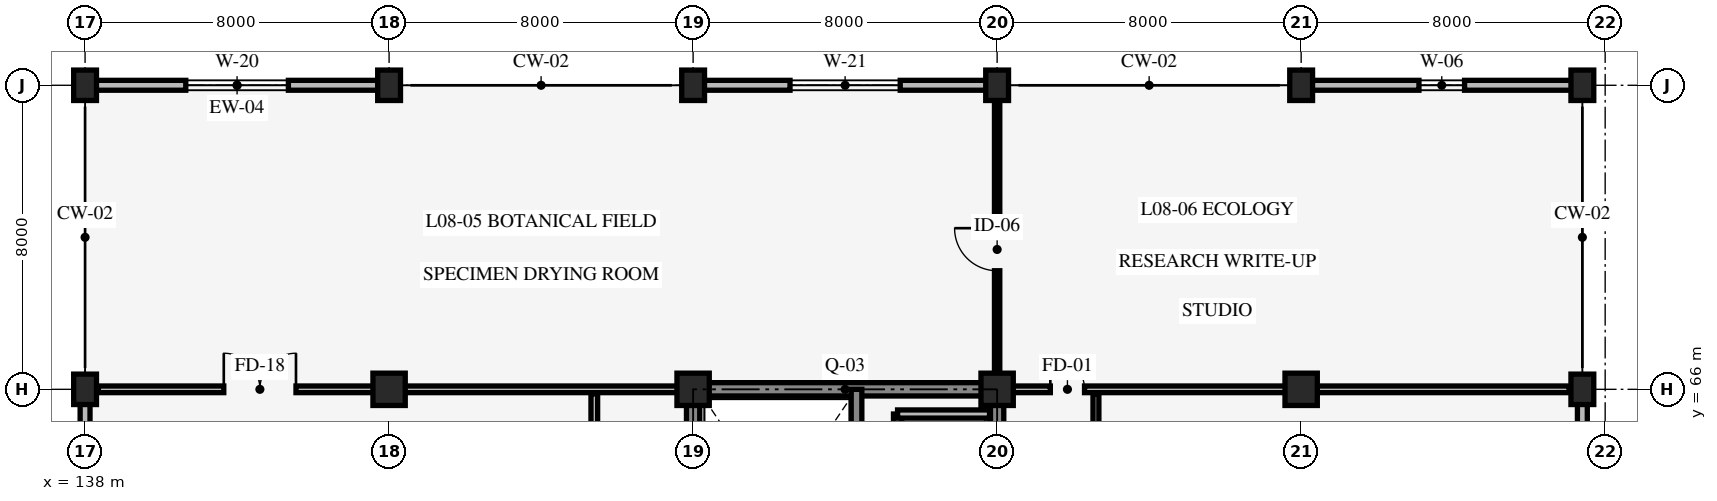
"""IFC4 building model, lengths in metres.
Left out: names, types, materials, properties, quantities, classifications, styles, units other than length and angle.
Written with IfcOpenShell. Run it as: python <this file> out.ifc"""

import sys

from ifc_helpers import new_model, si_unit, direction, frame, frame_2d, origin, origin_2d, place, context, subcontext, project, spatial, rectangle, extrude, element, fill, save


model = new_model("IFC4")
c1 = context("Model", 3, precision=1e-05, world=origin(), true_north=direction((0.0, 1.0)))
c2 = subcontext(c1, "Body", "Model", "MODEL_VIEW")
j1 = project(units=[si_unit("LENGTHUNIT", "METRE"), si_unit("PLANEANGLEUNIT", "RADIAN")], contexts=[c1])
p1 = place(None, origin())
s1 = spatial("IfcSite", under=j1, at=p1, CompositionType="ELEMENT")
p2 = place(p1, origin())
s2 = spatial("IfcBuilding", under=s1, at=p2, CompositionType="ELEMENT")
p3 = place(p2, frame((0.0, 0.0, 31.8)))
s3 = spatial("IfcBuildingStorey", under=s2, at=p3, CompositionType="ELEMENT", Elevation=31.8)
p4 = place(p3, frame((162.0, 58.0, 0.0), z_axis=(0.0, 0.0, 1.0), x_axis=(0.0, 1.0, 0.0)))
e1 = element("IfcWall", 1, at=p4, inside=s3, PredefinedType="SHEAR", context=c2, shape_type="SweptSolid", body=[
    extrude(rectangle(XDim=8.0, YDim=0.35, at=frame_2d((4.0, 0.0))), origin(), (0.0, 0.0, 1.0), 3.95),
])
p5 = place(p4, frame((3.275, 0.0, 0.0)))
e2 = element("IfcOpeningElement", 2, at=p5, cuts=e1, PredefinedType="OPENING", context=c2, shape_type="SweptSolid", body=[
    extrude(rectangle(XDim=1.05, YDim=2.2, at=frame_2d((0.525, 1.1))), frame((0.0, 0.185, 0.0), z_axis=(0.0, -1.0, 0.0), x_axis=(1.0, 0.0, 0.0)), (0.0, 0.0, 1.0), 0.37),
])
p6 = place(p4, frame((5.45, 0.0, 0.0)))
e3 = element("IfcOpeningElement", 3, at=p6, cuts=e1, PredefinedType="OPENING", context=c2, shape_type="SweptSolid", body=[
    extrude(rectangle(XDim=1.4, YDim=2.3, at=frame_2d((0.7, 1.15))), frame((0.0, 0.185, 0.0), z_axis=(0.0, -1.0, 0.0), x_axis=(1.0, 0.0, 0.0)), (0.0, 0.0, 1.0), 0.37),
])
for number, where, z_axis, x_axis in (
    (4, (162.0, 66.0, 0.0), (0.0, 0.0, 1.0), (-1.0, 0.0, 0.0)),
    (5, (154.0, 66.0, 0.0), (0.0, 0.0, 1.0), (0.0, -1.0, 0.0)),
):
    element("IfcWall", number, at=place(p3, frame(where, z_axis=z_axis, x_axis=x_axis)), inside=s3, PredefinedType="SHEAR", context=c2, shape_type="SweptSolid", body=[
        extrude(rectangle(XDim=8.0, YDim=0.35, at=frame_2d((4.0, 0.0))), origin(), (0.0, 0.0, 1.0), 3.95),
    ])
p7 = place(p3, frame((158.3, 58.0, 0.0), z_axis=(0.0, 0.0, 1.0), x_axis=(0.0, 1.0, 0.0)))
e6 = element("IfcWall", 6, at=p7, inside=s3, PredefinedType="SHEAR", context=c2, shape_type="SweptSolid", body=[
    extrude(rectangle(XDim=8.0, YDim=0.28, at=frame_2d((4.0, 0.0))), origin(), (0.0, 0.0, 1.0), 3.95),
])
for number, where, z_axis, x_axis in (
    (7, (138.0, 66.0, 0.0), (0.0, 0.0, 1.0), (1.0, 0.0, 0.0)),
    (8, (138.0, 74.0, 0.0), (0.0, 0.0, 1.0), (1.0, 0.0, 0.0)),
):
    element("IfcColumn", number, at=place(p3, frame(where, z_axis=z_axis, x_axis=x_axis)), inside=s3, PredefinedType="COLUMN", context=c2, shape_type="SweptSolid", body=[
        extrude(rectangle(XDim=0.6, YDim=0.8, at=origin_2d()), origin(), (0.0, 0.0, 1.0), 4.2),
    ])
p8 = place(p3, frame((146.0, 66.0, 0.0), z_axis=(0.0, 0.0, 1.0), x_axis=(1.0, 0.0, 0.0)))
e9 = element("IfcColumn", 9, at=p8, inside=s3, PredefinedType="COLUMN", context=c2, shape_type="SweptSolid", body=[
    extrude(rectangle(XDim=0.85, YDim=0.85, at=origin_2d()), origin(), (0.0, 0.0, 1.0), 4.2),
])
p9 = place(p3, frame((146.0, 74.0, 0.0), z_axis=(0.0, 0.0, 1.0), x_axis=(1.0, 0.0, 0.0)))
e10 = element("IfcColumn", 10, at=p9, inside=s3, PredefinedType="COLUMN", context=c2, shape_type="SweptSolid", body=[
    extrude(rectangle(XDim=0.6, YDim=0.8, at=origin_2d()), origin(), (0.0, 0.0, 1.0), 4.2),
])
p10 = place(p3, frame((154.0, 66.0, 0.0), z_axis=(0.0, 0.0, 1.0), x_axis=(1.0, 0.0, 0.0)))
e11 = element("IfcColumn", 11, at=p10, inside=s3, PredefinedType="COLUMN", context=c2, shape_type="SweptSolid", body=[
    extrude(rectangle(XDim=0.85, YDim=0.85, at=origin_2d()), origin(), (0.0, 0.0, 1.0), 4.2),
])
p11 = place(p3, frame((154.0, 74.0, 0.0), z_axis=(0.0, 0.0, 1.0), x_axis=(1.0, 0.0, 0.0)))
e12 = element("IfcColumn", 12, at=p11, inside=s3, PredefinedType="COLUMN", context=c2, shape_type="SweptSolid", body=[
    extrude(rectangle(XDim=0.6, YDim=0.8, at=origin_2d()), origin(), (0.0, 0.0, 1.0), 4.2),
])
p12 = place(p3, frame((162.0, 66.0, 0.0), z_axis=(0.0, 0.0, 1.0), x_axis=(1.0, 0.0, 0.0)))
e13 = element("IfcColumn", 13, at=p12, inside=s3, PredefinedType="COLUMN", context=c2, shape_type="SweptSolid", body=[
    extrude(rectangle(XDim=0.85, YDim=0.85, at=origin_2d()), origin(), (0.0, 0.0, 1.0), 4.2),
])
p13 = place(p3, frame((162.0, 74.0, 0.0), z_axis=(0.0, 0.0, 1.0), x_axis=(1.0, 0.0, 0.0)))
e14 = element("IfcColumn", 14, at=p13, inside=s3, PredefinedType="COLUMN", context=c2, shape_type="SweptSolid", body=[
    extrude(rectangle(XDim=0.6, YDim=0.8, at=origin_2d()), origin(), (0.0, 0.0, 1.0), 4.2),
])
p14 = place(p3, frame((170.0, 66.0, 0.0), z_axis=(0.0, 0.0, 1.0), x_axis=(1.0, 0.0, 0.0)))
e15 = element("IfcColumn", 15, at=p14, inside=s3, PredefinedType="COLUMN", context=c2, shape_type="SweptSolid", body=[
    extrude(rectangle(XDim=0.85, YDim=0.85, at=origin_2d()), origin(), (0.0, 0.0, 1.0), 4.2),
])
for number, where, z_axis, x_axis in (
    (16, (170.0, 74.0, 0.0), (0.0, 0.0, 1.0), (1.0, 0.0, 0.0)),
    (17, (177.4, 66.0, 0.0), (0.0, 0.0, 1.0), (1.0, 0.0, 0.0)),
    (18, (177.4, 74.0, 0.0), (0.0, 0.0, 1.0), (1.0, 0.0, 0.0)),
):
    element("IfcColumn", number, at=place(p3, frame(where, z_axis=z_axis, x_axis=x_axis)), inside=s3, PredefinedType="COLUMN", context=c2, shape_type="SweptSolid", body=[
        extrude(rectangle(XDim=0.6, YDim=0.8, at=origin_2d()), origin(), (0.0, 0.0, 1.0), 4.2),
    ])
p15 = place(p3, frame((138.0, 58.0, 0.0), z_axis=(0.0, 0.0, 1.0), x_axis=(0.0, 1.0, 0.0)))
e19 = element("IfcWall", 19, at=p15, inside=s3, PredefinedType="STANDARD", context=c2, shape_type="SweptSolid", body=[
    extrude(rectangle(XDim=8.0, YDim=0.26, at=frame_2d((4.0, 0.0))), origin(), (0.0, 0.0, 1.0), 3.31),
])
p16 = place(p15, frame((2.85, 0.0, 0.85)))
e20 = element("IfcOpeningElement", 20, at=p16, cuts=e19, PredefinedType="OPENING", context=c2, shape_type="SweptSolid", body=[
    extrude(rectangle(XDim=2.3, YDim=1.5, at=frame_2d((1.15, 0.75))), frame((0.0, 0.14, 0.0), z_axis=(0.0, -1.0, 0.0), x_axis=(1.0, 0.0, 0.0)), (0.0, 0.0, 1.0), 0.28),
])
p17 = place(p3, frame((138.0, 74.0, 0.0), z_axis=(0.0, 0.0, 1.0), x_axis=(1.0, 0.0, 0.0)))
e21 = element("IfcWall", 21, at=p17, inside=s3, PredefinedType="STANDARD", context=c2, shape_type="SweptSolid", body=[
    extrude(rectangle(XDim=8.0, YDim=0.26, at=frame_2d((4.0, 0.0))), origin(), (0.0, 0.0, 1.0), 3.36),
])
p18 = place(p17, frame((2.65, 0.0, 0.85)))
e22 = element("IfcOpeningElement", 22, at=p18, cuts=e21, PredefinedType="OPENING", context=c2, shape_type="SweptSolid", body=[
    extrude(rectangle(XDim=2.7, YDim=1.8, at=frame_2d((1.35, 0.9))), frame((0.0, 0.14, 0.0), z_axis=(0.0, -1.0, 0.0), x_axis=(1.0, 0.0, 0.0)), (0.0, 0.0, 1.0), 0.28),
])
p19 = place(p3, frame((154.0, 74.0, 0.0), z_axis=(0.0, 0.0, 1.0), x_axis=(1.0, 0.0, 0.0)))
e23 = element("IfcWall", 23, at=p19, inside=s3, PredefinedType="STANDARD", context=c2, shape_type="SweptSolid", body=[
    extrude(rectangle(XDim=8.0, YDim=0.26, at=frame_2d((4.0, 0.0))), origin(), (0.0, 0.0, 1.0), 3.26),
])
p20 = place(p19, frame((2.55, 0.0, 0.85)))
e24 = element("IfcOpeningElement", 24, at=p20, cuts=e23, PredefinedType="OPENING", context=c2, shape_type="SweptSolid", body=[
    extrude(rectangle(XDim=2.9, YDim=1.7, at=frame_2d((1.45, 0.85))), frame((0.0, 0.14, 0.0), z_axis=(0.0, -1.0, 0.0), x_axis=(1.0, 0.0, 0.0)), (0.0, 0.0, 1.0), 0.28),
])
p21 = place(p3, frame((170.0, 74.0, 0.0), z_axis=(0.0, 0.0, 1.0), x_axis=(1.0, 0.0, 0.0)))
e25 = element("IfcWall", 25, at=p21, inside=s3, PredefinedType="STANDARD", context=c2, shape_type="SweptSolid", body=[
    extrude(rectangle(XDim=7.4, YDim=0.26, at=frame_2d((3.7, 0.0))), origin(), (0.0, 0.0, 1.0), 3.26),
])
p22 = place(p21, frame((3.1, 0.0, 0.85)))
e26 = element("IfcOpeningElement", 26, at=p22, cuts=e25, PredefinedType="OPENING", context=c2, shape_type="SweptSolid", body=[
    extrude(rectangle(XDim=1.2, YDim=1.2, at=frame_2d((0.6, 0.6))), frame((0.0, 0.14, 0.0), z_axis=(0.0, -1.0, 0.0), x_axis=(1.0, 0.0, 0.0)), (0.0, 0.0, 1.0), 0.28),
])
p23 = place(p3, frame((177.4, 66.0, 0.0), z_axis=(0.0, 0.0, 1.0), x_axis=(0.0, -1.0, 0.0)))
e27 = element("IfcWall", 27, at=p23, inside=s3, PredefinedType="STANDARD", context=c2, shape_type="SweptSolid", body=[
    extrude(rectangle(XDim=8.0, YDim=0.26, at=frame_2d((4.0, 0.0))), origin(), (0.0, 0.0, 1.0), 3.31),
])
p24 = place(p23, frame((3.15, 0.0, 0.85)))
e28 = element("IfcOpeningElement", 28, at=p24, cuts=e27, PredefinedType="OPENING", context=c2, shape_type="SweptSolid", body=[
    extrude(rectangle(XDim=1.7, YDim=1.2, at=frame_2d((0.85, 0.6))), frame((0.0, 0.14, 0.0), z_axis=(0.0, -1.0, 0.0), x_axis=(1.0, 0.0, 0.0)), (0.0, 0.0, 1.0), 0.28),
])
p25 = place(p3, frame((159.38, 62.9, 0.0), z_axis=(0.0, 0.0, 1.0), x_axis=(0.0, 1.0, 0.0)))
e29 = element("IfcWall", 29, at=p25, inside=s3, PredefinedType="STANDARD", context=c2, shape_type="SweptSolid", body=[
    extrude(rectangle(XDim=2.45, YDim=0.215, at=frame_2d((1.225, 0.0))), origin(), (0.0, 0.0, 1.0), 3.9),
])
p26 = place(p3, frame((159.38, 65.35, 0.0), z_axis=(0.0, 0.0, 1.0), x_axis=(1.0, 0.0, 0.0)))
e30 = element("IfcWall", 30, at=p26, inside=s3, PredefinedType="STANDARD", context=c2, shape_type="SweptSolid", body=[
    extrude(rectangle(XDim=2.42, YDim=0.215, at=frame_2d((1.21, 0.0))), origin(), (0.0, 0.0, 1.0), 3.9),
])
p27 = place(p3, frame((151.4, 54.12, 0.0), z_axis=(0.0, 0.0, 1.0), x_axis=(0.0, 1.0, 0.0)))
e31 = element("IfcWall", 31, at=p27, inside=s3, PredefinedType="STANDARD", context=c2, shape_type="SweptSolid", body=[
    extrude(rectangle(XDim=11.76, YDim=0.175, at=frame_2d((5.88, 0.0))), origin(), (0.0, 0.0, 1.0), 3.9),
])
p28 = place(p27, frame((5.18, 0.0, 0.0)))
e32 = element("IfcOpeningElement", 32, at=p28, cuts=e31, PredefinedType="OPENING", context=c2, shape_type="SweptSolid", body=[
    extrude(rectangle(XDim=1.4, YDim=2.2, at=frame_2d((0.7, 1.1))), frame((0.0, 0.098, 0.0), z_axis=(0.0, -1.0, 0.0), x_axis=(1.0, 0.0, 0.0)), (0.0, 0.0, 1.0), 0.195),
])
p29 = place(p3, frame((164.6, 58.08, 0.0), z_axis=(0.0, 0.0, 1.0), x_axis=(0.0, 1.0, 0.0)))
e33 = element("IfcWall", 33, at=p29, inside=s3, PredefinedType="STANDARD", context=c2, shape_type="SweptSolid", body=[
    extrude(rectangle(XDim=7.8, YDim=0.155, at=frame_2d((3.9, 0.0))), origin(), (0.0, 0.0, 1.0), 3.9),
])
p30 = place(p29, frame((3.45, 0.0, 0.0)))
e34 = element("IfcOpeningElement", 34, at=p30, cuts=e33, PredefinedType="OPENING", context=c2, shape_type="SweptSolid", body=[
    extrude(rectangle(XDim=0.9, YDim=2.1, at=frame_2d((0.45, 1.05))), frame((0.0, 0.087, 0.0), z_axis=(0.0, -1.0, 0.0), x_axis=(1.0, 0.0, 0.0)), (0.0, 0.0, 1.0), 0.175),
])
p31 = place(p3, frame((138.35, 66.0, 0.0), z_axis=(0.0, 0.0, 1.0), x_axis=(1.0, 0.0, 0.0)))
e35 = element("IfcWall", 35, at=p31, inside=s3, PredefinedType="STANDARD", context=c2, shape_type="SweptSolid", body=[
    extrude(rectangle(XDim=15.3, YDim=0.175, at=frame_2d((7.65, 0.0))), origin(), (0.0, 0.0, 1.0), 3.26),
])
p32 = place(p31, frame((3.3, 0.0, 0.0)))
e36 = element("IfcOpeningElement", 36, at=p32, cuts=e35, PredefinedType="OPENING", context=c2, shape_type="SweptSolid", body=[
    extrude(rectangle(XDim=1.9, YDim=2.35, at=frame_2d((0.95, 1.175))), frame((0.0, 0.098, 0.0), z_axis=(0.0, -1.0, 0.0), x_axis=(1.0, 0.0, 0.0)), (0.0, 0.0, 1.0), 0.195),
])
p33 = place(p3, frame((162.0, 66.12, 0.0), z_axis=(0.0, 0.0, 1.0), x_axis=(0.0, 1.0, 0.0)))
e37 = element("IfcWall", 37, at=p33, inside=s3, PredefinedType="STANDARD", context=c2, shape_type="SweptSolid", body=[
    extrude(rectangle(XDim=7.83, YDim=0.14, at=frame_2d((3.915, 0.0))), origin(), (0.0, 0.0, 1.0), 3.31),
])
p34 = place(p33, frame((3.0, 0.0, 0.0)))
e38 = element("IfcOpeningElement", 38, at=p34, cuts=e37, PredefinedType="OPENING", context=c2, shape_type="SweptSolid", body=[
    extrude(rectangle(XDim=1.12, YDim=2.12, at=frame_2d((0.56, 1.06))), frame((0.0, 0.08, 0.0), z_axis=(0.0, -1.0, 0.0), x_axis=(1.0, 0.0, 0.0)), (0.0, 0.0, 1.0), 0.16),
])
p35 = place(p3, frame((162.35, 66.0, 0.0), z_axis=(0.0, 0.0, 1.0), x_axis=(1.0, 0.0, 0.0)))
e39 = element("IfcWall", 39, at=p35, inside=s3, PredefinedType="STANDARD", context=c2, shape_type="SweptSolid", body=[
    extrude(rectangle(XDim=14.7, YDim=0.175, at=frame_2d((7.35, 0.0))), origin(), (0.0, 0.0, 1.0), 3.26),
])
p36 = place(p35, frame((1.05, 0.0, 0.0)))
e40 = element("IfcOpeningElement", 40, at=p36, cuts=e39, PredefinedType="OPENING", context=c2, shape_type="SweptSolid", body=[
    extrude(rectangle(XDim=0.9, YDim=2.1, at=frame_2d((0.45, 1.05))), frame((0.0, 0.098, 0.0), z_axis=(0.0, -1.0, 0.0), x_axis=(1.0, 0.0, 0.0)), (0.0, 0.0, 1.0), 0.195),
])
p37 = place(p18, origin())
e41 = element("IfcWindow", 41, at=p37, inside=s3, PartitioningType="SINGLE_PANEL", PredefinedType="WINDOW", context=c2, shape_type="SweptSolid", body=[
    extrude(rectangle(XDim=2.7, YDim=1.8, at=frame_2d((1.35, 0.9))), frame((0.0, 0.03, 0.0), z_axis=(0.0, -1.0, 0.0), x_axis=(1.0, 0.0, 0.0)), (0.0, 0.0, 1.0), 0.06),
])
fill(e22, e41)
p38 = place(p20, origin())
e42 = element("IfcWindow", 42, at=p38, inside=s3, PartitioningType="SINGLE_PANEL", PredefinedType="WINDOW", context=c2, shape_type="SweptSolid", body=[
    extrude(rectangle(XDim=2.9, YDim=1.7, at=frame_2d((1.45, 0.85))), frame((0.0, 0.03, 0.0), z_axis=(0.0, -1.0, 0.0), x_axis=(1.0, 0.0, 0.0)), (0.0, 0.0, 1.0), 0.06),
])
fill(e24, e42)
p39 = place(p22, origin())
e43 = element("IfcWindow", 43, at=p39, inside=s3, PartitioningType="SINGLE_PANEL", PredefinedType="WINDOW", context=c2, shape_type="SweptSolid", body=[
    extrude(rectangle(XDim=1.2, YDim=1.2, at=frame_2d((0.6, 0.6))), frame((0.0, 0.03, 0.0), z_axis=(0.0, -1.0, 0.0), x_axis=(1.0, 0.0, 0.0)), (0.0, 0.0, 1.0), 0.06),
])
fill(e26, e43)
p40 = place(p32, origin())
e44 = element("IfcDoor", 44, at=p40, inside=s3, OperationType="DOUBLE_DOOR_SINGLE_SWING", PredefinedType="DOOR", context=c2, shape_type="SweptSolid", body=[
    extrude(rectangle(XDim=1.9, YDim=2.35, at=frame_2d((0.95, 1.175))), frame((0.0, 0.025, 0.0), z_axis=(0.0, -1.0, 0.0), x_axis=(1.0, 0.0, 0.0)), (0.0, 0.0, 1.0), 0.05),
])
fill(e36, e44)
p41 = place(p34, origin())
e45 = element("IfcDoor", 45, at=p41, inside=s3, OperationType="SINGLE_SWING_RIGHT", PredefinedType="DOOR", context=c2, shape_type="SweptSolid", body=[
    extrude(rectangle(XDim=1.12, YDim=2.12, at=frame_2d((0.56, 1.06))), frame((0.0, 0.025, 0.0), z_axis=(0.0, -1.0, 0.0), x_axis=(1.0, 0.0, 0.0)), (0.0, 0.0, 1.0), 0.05),
])
fill(e38, e45)
p42 = place(p36, origin())
e46 = element("IfcDoor", 46, at=p42, inside=s3, OperationType="SINGLE_SWING_LEFT", PredefinedType="DOOR", context=c2, shape_type="SweptSolid", body=[
    extrude(rectangle(XDim=0.9, YDim=2.1, at=frame_2d((0.45, 1.05))), frame((0.0, 0.025, 0.0), z_axis=(0.0, -1.0, 0.0), x_axis=(1.0, 0.0, 0.0)), (0.0, 0.0, 1.0), 0.05),
])
fill(e40, e46)
save(model, sys.argv[1])
